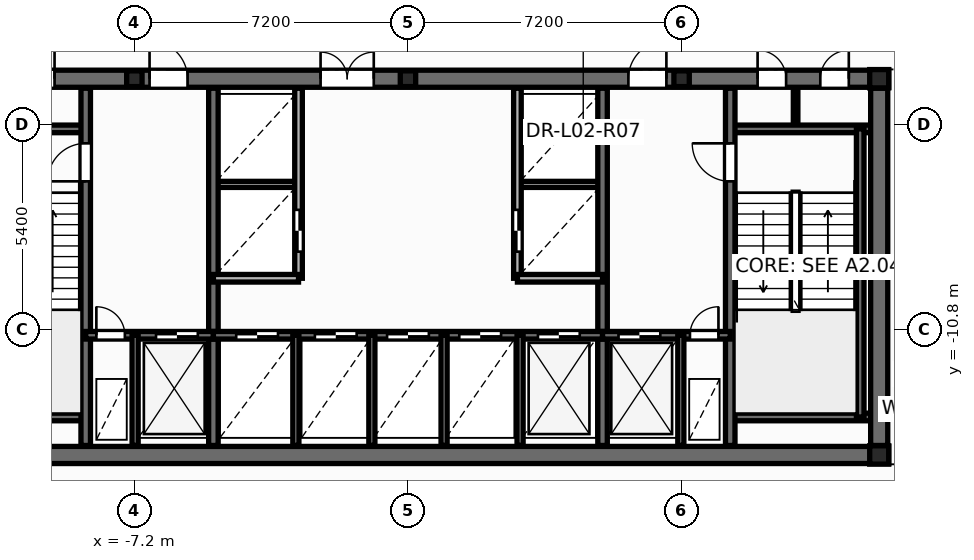
"""IFC4 building model, lengths in metres.
Left out: names, types, materials, properties, quantities, classifications, styles, units other than length and angle.
Written with IfcOpenShell. Run it as: python <this file> out.ifc"""

import sys

from ifc_helpers import new_model, si_unit, direction, frame, frame_2d, origin, origin_2d, place, context, subcontext, project, spatial, rectangle, i_section, extrude, element, fill, save


model = new_model("IFC4")
c1 = context("Model", 3, precision=1e-05, world=origin(), true_north=direction((0.0, 1.0)))
c2 = subcontext(c1, "Body", "Model", "MODEL_VIEW")
j1 = project(units=[si_unit("LENGTHUNIT", "METRE"), si_unit("PLANEANGLEUNIT", "RADIAN")], contexts=[c1])
p1 = place(None, origin())
s1 = spatial("IfcSite", under=j1, at=p1, CompositionType="ELEMENT")
p2 = place(p1, origin())
s2 = spatial("IfcBuilding", under=s1, at=p2, CompositionType="ELEMENT")
p3 = place(p2, frame((0.0, 0.0, 9.9)))
s3 = spatial("IfcBuildingStorey", under=s2, at=p3, CompositionType="ELEMENT", Elevation=9.9)
for number, where, z_axis, x_axis in (
    (1, (12.4, -14.1, 0.0), (0.0, 0.0, 1.0), (1.0, 0.0, 0.0)),
    (2, (12.4, -4.2, 0.0), (0.0, 0.0, 1.0), (1.0, 0.0, 0.0)),
):
    element("IfcColumn", number, at=place(p3, frame(where, z_axis=z_axis, x_axis=x_axis)), inside=s3, PredefinedType="COLUMN", context=c2, shape_type="SweptSolid", body=[
        extrude(i_section(OverallWidth=0.5, OverallDepth=0.482, WebThickness=0.04, FlangeThickness=0.045, at=origin_2d()), origin(), (0.0, 0.0, 1.0), 4.5),
    ])
for number, where, z_axis, x_axis in (
    (3, (-7.2, -4.2, 0.0), (0.0, 0.0, 1.0), (1.0, 0.0, 0.0)),
    (4, (0.0, -4.2, 0.0), (0.0, 0.0, 1.0), (1.0, 0.0, 0.0)),
    (5, (7.2, -4.2, 0.0), (0.0, 0.0, 1.0), (1.0, 0.0, 0.0)),
):
    element("IfcColumn", number, at=place(p3, frame(where, z_axis=z_axis, x_axis=x_axis)), inside=s3, PredefinedType="PILASTER", context=c2, shape_type="SweptSolid", body=[
        extrude(i_section(OverallWidth=0.405, OverallDepth=0.414, WebThickness=0.022, FlangeThickness=0.032, at=origin_2d()), origin(), (0.0, 0.0, 1.0), 4.5),
    ])
for number, where, z_axis, x_axis in (
    (6, (-5.12, -6.98, 0.0), (0.0, 0.0, 1.0), (1.0, 0.0, 0.0)),
    (7, (2.88, -6.98, 0.0), (0.0, 0.0, 1.0), (1.0, 0.0, 0.0)),
):
    element("IfcWall", number, at=place(p3, frame(where, z_axis=z_axis, x_axis=x_axis)), inside=s3, PredefinedType="PARTITIONING", context=c2, shape_type="SweptSolid", body=[
        extrude(rectangle(XDim=2.24, YDim=0.16, at=frame_2d((1.12, 0.0))), origin(), (0.0, 0.0, 1.0), 4.22),
    ])
p4 = place(p3, frame((10.2, -5.52, 0.0), z_axis=(0.0, 0.0, 1.0), x_axis=(0.0, 1.0, 0.0)))
e8 = element("IfcWall", 8, at=p4, inside=s3, PredefinedType="PARTITIONING", context=c2, shape_type="SweptSolid", body=[
    extrude(rectangle(XDim=1.12, YDim=0.12, at=frame_2d((0.56, 0.0))), origin(), (0.0, 0.0, 1.0), 4.22),
])
p5 = place(p3, frame((-12.65, -14.1, 0.0), z_axis=(0.0, 0.0, 1.0), x_axis=(1.0, 0.0, 0.0)))
e9 = element("IfcWall", 9, at=p5, inside=s3, PredefinedType="SHEAR", context=c2, shape_type="SweptSolid", body=[
    extrude(rectangle(XDim=25.3, YDim=0.45, at=frame_2d((12.65, 0.0))), origin(), (0.0, 0.0, 1.0), 4.5),
])
p6 = place(p3, frame((-12.65, -4.2, 0.0), z_axis=(0.0, 0.0, 1.0), x_axis=(1.0, 0.0, 0.0)))
e10 = element("IfcWall", 10, at=p6, inside=s3, PredefinedType="SHEAR", context=c2, shape_type="SweptSolid", body=[
    extrude(rectangle(XDim=25.3, YDim=0.45, at=frame_2d((12.65, 0.0))), origin(), (0.0, 0.0, 1.0), 4.5),
])
p7 = place(p6, frame((0.95, 0.0, 0.0)))
e11 = element("IfcOpeningElement", 11, at=p7, cuts=e10, PredefinedType="OPENING", context=c2, shape_type="SweptSolid", body=[
    extrude(rectangle(XDim=0.756, YDim=2.054, at=frame_2d((0.375, 1.027))), frame((0.0, 0.235, 0.0), z_axis=(0.0, -1.0, 0.0), x_axis=(1.0, 0.0, 0.0)), (0.0, 0.0, 1.0), 0.47),
])
p8 = place(p6, frame((2.6, 0.0, 0.0)))
e12 = element("IfcOpeningElement", 12, at=p8, cuts=e10, PredefinedType="OPENING", context=c2, shape_type="SweptSolid", body=[
    extrude(rectangle(XDim=0.756, YDim=2.054, at=frame_2d((0.375, 1.027))), frame((0.0, 0.235, 0.0), z_axis=(0.0, -1.0, 0.0), x_axis=(1.0, 0.0, 0.0)), (0.0, 0.0, 1.0), 0.47),
])
p9 = place(p6, frame((21.85, 0.0, 0.0)))
e13 = element("IfcOpeningElement", 13, at=p9, cuts=e10, PredefinedType="OPENING", context=c2, shape_type="SweptSolid", body=[
    extrude(rectangle(XDim=0.756, YDim=2.054, at=frame_2d((0.375, 1.027))), frame((0.0, 0.235, 0.0), z_axis=(0.0, -1.0, 0.0), x_axis=(1.0, 0.0, 0.0)), (0.0, 0.0, 1.0), 0.47),
])
p10 = place(p6, frame((23.5, 0.0, 0.0)))
e14 = element("IfcOpeningElement", 14, at=p10, cuts=e10, PredefinedType="OPENING", context=c2, shape_type="SweptSolid", body=[
    extrude(rectangle(XDim=0.756, YDim=2.054, at=frame_2d((0.375, 1.027))), frame((0.0, 0.235, 0.0), z_axis=(0.0, -1.0, 0.0), x_axis=(1.0, 0.0, 0.0)), (0.0, 0.0, 1.0), 0.47),
])
p11 = place(p6, frame((5.85, 0.0, 0.0)))
e15 = element("IfcOpeningElement", 15, at=p11, cuts=e10, PredefinedType="OPENING", context=c2, shape_type="SweptSolid", body=[
    extrude(rectangle(XDim=1.006, YDim=2.104, at=frame_2d((0.5, 1.052))), frame((0.0, 0.235, 0.0), z_axis=(0.0, -1.0, 0.0), x_axis=(1.0, 0.0, 0.0)), (0.0, 0.0, 1.0), 0.47),
])
p12 = place(p6, frame((10.35, 0.0, 0.0)))
e16 = element("IfcOpeningElement", 16, at=p12, cuts=e10, PredefinedType="OPENING", context=c2, shape_type="SweptSolid", body=[
    extrude(rectangle(XDim=1.406, YDim=2.154, at=frame_2d((0.7, 1.077))), frame((0.0, 0.235, 0.0), z_axis=(0.0, -1.0, 0.0), x_axis=(1.0, 0.0, 0.0)), (0.0, 0.0, 1.0), 0.47),
])
p13 = place(p6, frame((18.45, 0.0, 0.0)))
e17 = element("IfcOpeningElement", 17, at=p13, cuts=e10, PredefinedType="OPENING", context=c2, shape_type="SweptSolid", body=[
    extrude(rectangle(XDim=1.006, YDim=2.104, at=frame_2d((0.5, 1.052))), frame((0.0, 0.235, 0.0), z_axis=(0.0, -1.0, 0.0), x_axis=(1.0, 0.0, 0.0)), (0.0, 0.0, 1.0), 0.47),
])
for number, where, z_axis, x_axis in (
    (18, (-12.35, -5.52, 0.0), (0.0, 0.0, 1.0), (1.0, 0.0, 0.0)),
    (19, (-12.35, -13.1, 0.0), (0.0, 0.0, 1.0), (1.0, 0.0, 0.0)),
    (20, (8.48, -5.52, 0.0), (0.0, 0.0, 1.0), (1.0, 0.0, 0.0)),
    (21, (8.48, -13.1, 0.0), (0.0, 0.0, 1.0), (1.0, 0.0, 0.0)),
):
    element("IfcWall", number, at=place(p3, frame(where, z_axis=z_axis, x_axis=x_axis)), inside=s3, PredefinedType="SOLIDWALL", context=c2, shape_type="SweptSolid", body=[
        extrude(rectangle(XDim=3.87, YDim=0.2, at=frame_2d((1.935, 0.0))), origin(), (0.0, 0.0, 1.0), 4.5),
    ])
p14 = place(p3, frame((11.9, -13.1, 0.0), z_axis=(0.0, 0.0, 1.0), x_axis=(0.0, 1.0, 0.0)))
e22 = element("IfcWall", 22, at=p14, inside=s3, PredefinedType="SOLIDWALL", context=c2, shape_type="SweptSolid", body=[
    extrude(rectangle(XDim=7.58, YDim=0.2, at=frame_2d((3.79, 0.0))), origin(), (0.0, 0.0, 1.0), 4.5),
])
p15 = place(p3, frame((-8.48, -13.85, 0.0), z_axis=(0.0, 0.0, 1.0), x_axis=(0.0, 1.0, 0.0)))
e23 = element("IfcWall", 23, at=p15, inside=s3, PredefinedType="SHEAR", context=c2, shape_type="SweptSolid", body=[
    extrude(rectangle(XDim=9.4, YDim=0.25, at=frame_2d((4.7, 0.0))), origin(), (0.0, 0.0, 1.0), 4.5),
])
p16 = place(p15, frame((6.95, 0.0, 0.0)))
e24 = element("IfcOpeningElement", 24, at=p16, cuts=e23, PredefinedType="OPENING", context=c2, shape_type="SweptSolid", body=[
    extrude(rectangle(XDim=1.006, YDim=2.104, at=frame_2d((0.5, 1.052))), frame((0.0, 0.135, 0.0), z_axis=(0.0, -1.0, 0.0), x_axis=(1.0, 0.0, 0.0)), (0.0, 0.0, 1.0), 0.27),
])
p17 = place(p3, frame((8.48, -13.85, 0.0), z_axis=(0.0, 0.0, 1.0), x_axis=(0.0, 1.0, 0.0)))
e25 = element("IfcWall", 25, at=p17, inside=s3, PredefinedType="SHEAR", context=c2, shape_type="SweptSolid", body=[
    extrude(rectangle(XDim=9.4, YDim=0.25, at=frame_2d((4.7, 0.0))), origin(), (0.0, 0.0, 1.0), 4.5),
])
p18 = place(p17, frame((6.95, 0.0, 0.0)))
e26 = element("IfcOpeningElement", 26, at=p18, cuts=e25, PredefinedType="OPENING", context=c2, shape_type="SweptSolid", body=[
    extrude(rectangle(XDim=1.006, YDim=2.104, at=frame_2d((0.5, 1.052))), frame((0.0, 0.135, 0.0), z_axis=(0.0, -1.0, 0.0), x_axis=(1.0, 0.0, 0.0)), (0.0, 0.0, 1.0), 0.27),
])
for number, where, z_axis, x_axis in (
    (27, (-5.12, -13.85, 0.0), (0.0, 0.0, 1.0), (0.0, 1.0, 0.0)),
    (28, (5.12, -13.85, 0.0), (0.0, 0.0, 1.0), (0.0, 1.0, 0.0)),
):
    element("IfcWall", number, at=place(p3, frame(where, z_axis=z_axis, x_axis=x_axis)), inside=s3, PredefinedType="SHEAR", context=c2, shape_type="SweptSolid", body=[
        extrude(rectangle(XDim=9.4, YDim=0.25, at=frame_2d((4.7, 0.0))), origin(), (0.0, 0.0, 1.0), 4.5),
    ])
p19 = place(p3, frame((-8.48, -10.95, 0.0), z_axis=(0.0, 0.0, 1.0), x_axis=(1.0, 0.0, 0.0)))
e29 = element("IfcWall", 29, at=p19, inside=s3, PredefinedType="SOLIDWALL", context=c2, shape_type="SweptSolid", body=[
    extrude(rectangle(XDim=3.36, YDim=0.2, at=frame_2d((1.68, 0.0))), origin(), (0.0, 0.0, 1.0), 4.5),
])
p20 = place(p19, frame((0.28, 0.0, 0.0)))
e30 = element("IfcOpeningElement", 30, at=p20, cuts=e29, PredefinedType="OPENING", context=c2, shape_type="SweptSolid", body=[
    extrude(rectangle(XDim=0.756, YDim=2.054, at=frame_2d((0.375, 1.027))), frame((0.0, 0.11, 0.0), z_axis=(0.0, -1.0, 0.0), x_axis=(1.0, 0.0, 0.0)), (0.0, 0.0, 1.0), 0.22),
])
p21 = place(p19, frame((1.85, 0.0, 0.0)))
e31 = element("IfcOpeningElement", 31, at=p21, cuts=e29, PredefinedType="OPENING", context=c2, shape_type="SweptSolid", body=[
    extrude(rectangle(XDim=1.106, YDim=2.104, at=frame_2d((0.55, 1.052))), frame((0.0, 0.11, 0.0), z_axis=(0.0, -1.0, 0.0), x_axis=(1.0, 0.0, 0.0)), (0.0, 0.0, 1.0), 0.22),
])
p22 = place(p3, frame((-5.12, -10.95, 0.0), z_axis=(0.0, 0.0, 1.0), x_axis=(1.0, 0.0, 0.0)))
e32 = element("IfcWall", 32, at=p22, inside=s3, PredefinedType="SOLIDWALL", context=c2, shape_type="SweptSolid", body=[
    extrude(rectangle(XDim=10.24, YDim=0.2, at=frame_2d((5.12, 0.0))), origin(), (0.0, 0.0, 1.0), 4.5),
])
p23 = place(p22, frame((0.6, 0.0, 0.0)))
e33 = element("IfcOpeningElement", 33, at=p23, cuts=e32, PredefinedType="OPENING", context=c2, shape_type="SweptSolid", body=[
    extrude(rectangle(XDim=1.106, YDim=2.104, at=frame_2d((0.55, 1.052))), frame((0.0, 0.11, 0.0), z_axis=(0.0, -1.0, 0.0), x_axis=(1.0, 0.0, 0.0)), (0.0, 0.0, 1.0), 0.22),
])
p24 = place(p22, frame((2.67, 0.0, 0.0)))
e34 = element("IfcOpeningElement", 34, at=p24, cuts=e32, PredefinedType="OPENING", context=c2, shape_type="SweptSolid", body=[
    extrude(rectangle(XDim=1.106, YDim=2.104, at=frame_2d((0.55, 1.052))), frame((0.0, 0.11, 0.0), z_axis=(0.0, -1.0, 0.0), x_axis=(1.0, 0.0, 0.0)), (0.0, 0.0, 1.0), 0.22),
])
p25 = place(p22, frame((4.57, 0.0, 0.0)))
e35 = element("IfcOpeningElement", 35, at=p25, cuts=e32, PredefinedType="OPENING", context=c2, shape_type="SweptSolid", body=[
    extrude(rectangle(XDim=1.106, YDim=2.104, at=frame_2d((0.55, 1.052))), frame((0.0, 0.11, 0.0), z_axis=(0.0, -1.0, 0.0), x_axis=(1.0, 0.0, 0.0)), (0.0, 0.0, 1.0), 0.22),
])
p26 = place(p22, frame((6.47, 0.0, 0.0)))
e36 = element("IfcOpeningElement", 36, at=p26, cuts=e32, PredefinedType="OPENING", context=c2, shape_type="SweptSolid", body=[
    extrude(rectangle(XDim=1.106, YDim=2.104, at=frame_2d((0.55, 1.052))), frame((0.0, 0.11, 0.0), z_axis=(0.0, -1.0, 0.0), x_axis=(1.0, 0.0, 0.0)), (0.0, 0.0, 1.0), 0.22),
])
p27 = place(p22, frame((8.54, 0.0, 0.0)))
e37 = element("IfcOpeningElement", 37, at=p27, cuts=e32, PredefinedType="OPENING", context=c2, shape_type="SweptSolid", body=[
    extrude(rectangle(XDim=1.106, YDim=2.104, at=frame_2d((0.55, 1.052))), frame((0.0, 0.11, 0.0), z_axis=(0.0, -1.0, 0.0), x_axis=(1.0, 0.0, 0.0)), (0.0, 0.0, 1.0), 0.22),
])
p28 = place(p3, frame((5.12, -10.95, 0.0), z_axis=(0.0, 0.0, 1.0), x_axis=(1.0, 0.0, 0.0)))
e38 = element("IfcWall", 38, at=p28, inside=s3, PredefinedType="SOLIDWALL", context=c2, shape_type="SweptSolid", body=[
    extrude(rectangle(XDim=3.36, YDim=0.2, at=frame_2d((1.68, 0.0))), origin(), (0.0, 0.0, 1.0), 4.5),
])
p29 = place(p28, frame((0.42, 0.0, 0.0)))
e39 = element("IfcOpeningElement", 39, at=p29, cuts=e38, PredefinedType="OPENING", context=c2, shape_type="SweptSolid", body=[
    extrude(rectangle(XDim=1.106, YDim=2.104, at=frame_2d((0.55, 1.052))), frame((0.0, 0.11, 0.0), z_axis=(0.0, -1.0, 0.0), x_axis=(1.0, 0.0, 0.0)), (0.0, 0.0, 1.0), 0.22),
])
p30 = place(p28, frame((2.3, 0.0, 0.0)))
e40 = element("IfcOpeningElement", 40, at=p30, cuts=e38, PredefinedType="OPENING", context=c2, shape_type="SweptSolid", body=[
    extrude(rectangle(XDim=0.756, YDim=2.054, at=frame_2d((0.375, 1.027))), frame((0.0, 0.11, 0.0), z_axis=(0.0, -1.0, 0.0), x_axis=(1.0, 0.0, 0.0)), (0.0, 0.0, 1.0), 0.22),
])
for number, where, z_axis, x_axis in (
    (41, (-7.18, -13.85, 0.0), (0.0, 0.0, 1.0), (0.0, 1.0, 0.0)),
    (42, (7.18, -13.85, 0.0), (0.0, 0.0, 1.0), (0.0, 1.0, 0.0)),
    (43, (-2.95, -13.85, 0.0), (0.0, 0.0, 1.0), (0.0, 1.0, 0.0)),
    (44, (2.95, -13.85, 0.0), (0.0, 0.0, 1.0), (0.0, 1.0, 0.0)),
):
    element("IfcWall", number, at=place(p3, frame(where, z_axis=z_axis, x_axis=x_axis)), inside=s3, PredefinedType="PARTITIONING", context=c2, shape_type="SweptSolid", body=[
        extrude(rectangle(XDim=2.9, YDim=0.16, at=frame_2d((1.45, 0.0))), origin(), (0.0, 0.0, 1.0), 3.245),
    ])
p31 = place(p3, frame((12.4, -13.85, 0.0), z_axis=(0.0, 0.0, 1.0), x_axis=(0.0, 1.0, 0.0)))
e45 = element("IfcWall", 45, at=p31, inside=s3, PredefinedType="SHEAR", context=c2, shape_type="SweptSolid", body=[
    extrude(rectangle(XDim=9.4, YDim=0.45, at=frame_2d((4.7, 0.0))), origin(), (0.0, 0.0, 1.0), 4.5),
])
p32 = place(p3, frame((-2.88, -9.45, 0.0), z_axis=(0.0, 0.0, 1.0), x_axis=(0.0, 1.0, 0.0)))
e46 = element("IfcWall", 46, at=p32, inside=s3, PredefinedType="SOLIDWALL", context=c2, shape_type="SweptSolid", body=[
    extrude(rectangle(XDim=5.0, YDim=0.2, at=frame_2d((2.5, 0.0))), origin(), (0.0, 0.0, 1.0), 4.22),
])
p33 = place(p32, frame((0.7, 0.0, 0.0)))
e47 = element("IfcOpeningElement", 47, at=p33, cuts=e46, PredefinedType="OPENING", context=c2, shape_type="SweptSolid", body=[
    extrude(rectangle(XDim=1.106, YDim=2.104, at=frame_2d((0.55, 1.052))), frame((0.0, 0.11, 0.0), z_axis=(0.0, -1.0, 0.0), x_axis=(1.0, 0.0, 0.0)), (0.0, 0.0, 1.0), 0.22),
])
p34 = place(p3, frame((-5.12, -9.45, 0.0), z_axis=(0.0, 0.0, 1.0), x_axis=(1.0, 0.0, 0.0)))
e48 = element("IfcWall", 48, at=p34, inside=s3, PredefinedType="SOLIDWALL", context=c2, shape_type="SweptSolid", body=[
    extrude(rectangle(XDim=2.24, YDim=0.2, at=frame_2d((1.12, 0.0))), origin(), (0.0, 0.0, 1.0), 4.22),
])
p35 = place(p3, frame((2.88, -9.45, 0.0), z_axis=(0.0, 0.0, 1.0), x_axis=(0.0, 1.0, 0.0)))
e49 = element("IfcWall", 49, at=p35, inside=s3, PredefinedType="SOLIDWALL", context=c2, shape_type="SweptSolid", body=[
    extrude(rectangle(XDim=5.0, YDim=0.2, at=frame_2d((2.5, 0.0))), origin(), (0.0, 0.0, 1.0), 4.22),
])
p36 = place(p35, frame((0.7, 0.0, 0.0)))
e50 = element("IfcOpeningElement", 50, at=p36, cuts=e49, PredefinedType="OPENING", context=c2, shape_type="SweptSolid", body=[
    extrude(rectangle(XDim=1.106, YDim=2.104, at=frame_2d((0.55, 1.052))), frame((0.0, 0.11, 0.0), z_axis=(0.0, -1.0, 0.0), x_axis=(1.0, 0.0, 0.0)), (0.0, 0.0, 1.0), 0.22),
])
p37 = place(p3, frame((2.88, -9.45, 0.0), z_axis=(0.0, 0.0, 1.0), x_axis=(1.0, 0.0, 0.0)))
e51 = element("IfcWall", 51, at=p37, inside=s3, PredefinedType="SOLIDWALL", context=c2, shape_type="SweptSolid", body=[
    extrude(rectangle(XDim=2.24, YDim=0.2, at=frame_2d((1.12, 0.0))), origin(), (0.0, 0.0, 1.0), 4.22),
])
for number, where, z_axis, x_axis in (
    (52, (-0.95, -13.85, 0.0), (0.0, 0.0, 1.0), (0.0, 1.0, 0.0)),
    (53, (0.95, -13.85, 0.0), (0.0, 0.0, 1.0), (0.0, 1.0, 0.0)),
):
    element("IfcWall", number, at=place(p3, frame(where, z_axis=z_axis, x_axis=x_axis)), inside=s3, PredefinedType="PARTITIONING", context=c2, shape_type="SweptSolid", body=[
        extrude(rectangle(XDim=2.9, YDim=0.16, at=frame_2d((1.45, 0.0))), origin(), (0.0, 0.0, 1.0), 3.245),
    ])
p38 = place(p33, origin())
e54 = element("IfcDoor", 54, at=p38, inside=s3, OperationType="DOUBLE_DOOR_SLIDING", PredefinedType="DOOR", context=c2, shape_type="SweptSolid", body=[
    extrude(rectangle(XDim=1.1, YDim=2.1, at=frame_2d((0.55, 1.05))), frame((0.0, 0.025, 0.0), z_axis=(0.0, -1.0, 0.0), x_axis=(1.0, 0.0, 0.0)), (0.0, 0.0, 1.0), 0.05),
])
fill(e47, e54)
p39 = place(p36, origin())
e55 = element("IfcDoor", 55, at=p39, inside=s3, OperationType="DOUBLE_DOOR_SLIDING", PredefinedType="DOOR", context=c2, shape_type="SweptSolid", body=[
    extrude(rectangle(XDim=1.1, YDim=2.1, at=frame_2d((0.55, 1.05))), frame((0.0, 0.025, 0.0), z_axis=(0.0, -1.0, 0.0), x_axis=(1.0, 0.0, 0.0)), (0.0, 0.0, 1.0), 0.05),
])
fill(e50, e55)
p40 = place(p16, origin())
e56 = element("IfcDoor", 56, at=p40, inside=s3, OperationType="SINGLE_SWING_LEFT", PredefinedType="DOOR", context=c2, shape_type="SweptSolid", body=[
    extrude(rectangle(XDim=1.0, YDim=2.1, at=frame_2d((0.5, 1.05))), frame((0.0, 0.025, 0.0), z_axis=(0.0, -1.0, 0.0), x_axis=(1.0, 0.0, 0.0)), (0.0, 0.0, 1.0), 0.05),
])
fill(e24, e56)
p41 = place(p18, origin())
e57 = element("IfcDoor", 57, at=p41, inside=s3, OperationType="SINGLE_SWING_RIGHT", PredefinedType="DOOR", context=c2, shape_type="SweptSolid", body=[
    extrude(rectangle(XDim=1.0, YDim=2.1, at=frame_2d((0.5, 1.05))), frame((0.0, 0.025, 0.0), z_axis=(0.0, -1.0, 0.0), x_axis=(1.0, 0.0, 0.0)), (0.0, 0.0, 1.0), 0.05),
])
fill(e26, e57)
p42 = place(p20, origin())
e58 = element("IfcDoor", 58, at=p42, inside=s3, OperationType="SINGLE_SWING_LEFT", PredefinedType="DOOR", context=c2, shape_type="SweptSolid", body=[
    extrude(rectangle(XDim=0.75, YDim=2.05, at=frame_2d((0.375, 1.025))), frame((0.0, 0.025, 0.0), z_axis=(0.0, -1.0, 0.0), x_axis=(1.0, 0.0, 0.0)), (0.0, 0.0, 1.0), 0.05),
])
fill(e30, e58)
p43 = place(p21, origin())
e59 = element("IfcDoor", 59, at=p43, inside=s3, OperationType="DOUBLE_DOOR_SLIDING", PredefinedType="DOOR", context=c2, shape_type="SweptSolid", body=[
    extrude(rectangle(XDim=1.1, YDim=2.1, at=frame_2d((0.55, 1.05))), frame((0.0, 0.025, 0.0), z_axis=(0.0, -1.0, 0.0), x_axis=(1.0, 0.0, 0.0)), (0.0, 0.0, 1.0), 0.05),
])
fill(e31, e59)
p44 = place(p29, origin())
e60 = element("IfcDoor", 60, at=p44, inside=s3, OperationType="DOUBLE_DOOR_SLIDING", PredefinedType="DOOR", context=c2, shape_type="SweptSolid", body=[
    extrude(rectangle(XDim=1.1, YDim=2.1, at=frame_2d((0.55, 1.05))), frame((0.0, 0.025, 0.0), z_axis=(0.0, -1.0, 0.0), x_axis=(1.0, 0.0, 0.0)), (0.0, 0.0, 1.0), 0.05),
])
fill(e39, e60)
p45 = place(p30, origin())
e61 = element("IfcDoor", 61, at=p45, inside=s3, OperationType="SINGLE_SWING_RIGHT", PredefinedType="DOOR", context=c2, shape_type="SweptSolid", body=[
    extrude(rectangle(XDim=0.75, YDim=2.05, at=frame_2d((0.375, 1.025))), frame((0.0, 0.025, 0.0), z_axis=(0.0, -1.0, 0.0), x_axis=(1.0, 0.0, 0.0)), (0.0, 0.0, 1.0), 0.05),
])
fill(e40, e61)
p46 = place(p23, origin())
e62 = element("IfcDoor", 62, at=p46, inside=s3, OperationType="DOUBLE_DOOR_SLIDING", PredefinedType="DOOR", context=c2, shape_type="SweptSolid", body=[
    extrude(rectangle(XDim=1.1, YDim=2.1, at=frame_2d((0.55, 1.05))), frame((0.0, 0.025, 0.0), z_axis=(0.0, -1.0, 0.0), x_axis=(1.0, 0.0, 0.0)), (0.0, 0.0, 1.0), 0.05),
])
fill(e33, e62)
p47 = place(p24, origin())
e63 = element("IfcDoor", 63, at=p47, inside=s3, OperationType="DOUBLE_DOOR_SLIDING", PredefinedType="DOOR", context=c2, shape_type="SweptSolid", body=[
    extrude(rectangle(XDim=1.1, YDim=2.1, at=frame_2d((0.55, 1.05))), frame((0.0, 0.025, 0.0), z_axis=(0.0, -1.0, 0.0), x_axis=(1.0, 0.0, 0.0)), (0.0, 0.0, 1.0), 0.05),
])
fill(e34, e63)
p48 = place(p25, origin())
e64 = element("IfcDoor", 64, at=p48, inside=s3, OperationType="DOUBLE_DOOR_SLIDING", PredefinedType="DOOR", context=c2, shape_type="SweptSolid", body=[
    extrude(rectangle(XDim=1.1, YDim=2.1, at=frame_2d((0.55, 1.05))), frame((0.0, 0.025, 0.0), z_axis=(0.0, -1.0, 0.0), x_axis=(1.0, 0.0, 0.0)), (0.0, 0.0, 1.0), 0.05),
])
fill(e35, e64)
p49 = place(p26, origin())
e65 = element("IfcDoor", 65, at=p49, inside=s3, OperationType="DOUBLE_DOOR_SLIDING", PredefinedType="DOOR", context=c2, shape_type="SweptSolid", body=[
    extrude(rectangle(XDim=1.1, YDim=2.1, at=frame_2d((0.55, 1.05))), frame((0.0, 0.025, 0.0), z_axis=(0.0, -1.0, 0.0), x_axis=(1.0, 0.0, 0.0)), (0.0, 0.0, 1.0), 0.05),
])
fill(e36, e65)
p50 = place(p27, origin())
e66 = element("IfcDoor", 66, at=p50, inside=s3, OperationType="DOUBLE_DOOR_SLIDING", PredefinedType="DOOR", context=c2, shape_type="SweptSolid", body=[
    extrude(rectangle(XDim=1.1, YDim=2.1, at=frame_2d((0.55, 1.05))), frame((0.0, 0.025, 0.0), z_axis=(0.0, -1.0, 0.0), x_axis=(1.0, 0.0, 0.0)), (0.0, 0.0, 1.0), 0.05),
])
fill(e37, e66)
p51 = place(p8, origin())
e67 = element("IfcDoor", 67, at=p51, inside=s3, OperationType="SINGLE_SWING_RIGHT", PredefinedType="DOOR", context=c2, shape_type="SweptSolid", body=[
    extrude(rectangle(XDim=0.75, YDim=2.05, at=frame_2d((0.375, 1.025))), frame((0.0, 0.025, 0.0), z_axis=(0.0, -1.0, 0.0), x_axis=(1.0, 0.0, 0.0)), (0.0, 0.0, 1.0), 0.05),
])
fill(e12, e67)
p52 = place(p9, origin())
e68 = element("IfcDoor", 68, at=p52, inside=s3, OperationType="SINGLE_SWING_LEFT", PredefinedType="DOOR", context=c2, shape_type="SweptSolid", body=[
    extrude(rectangle(XDim=0.75, YDim=2.05, at=frame_2d((0.375, 1.025))), frame((0.0, 0.025, 0.0), z_axis=(0.0, -1.0, 0.0), x_axis=(1.0, 0.0, 0.0)), (0.0, 0.0, 1.0), 0.05),
])
fill(e13, e68)
p53 = place(p10, origin())
e69 = element("IfcDoor", 69, at=p53, inside=s3, OperationType="SINGLE_SWING_RIGHT", PredefinedType="DOOR", context=c2, shape_type="SweptSolid", body=[
    extrude(rectangle(XDim=0.75, YDim=2.05, at=frame_2d((0.375, 1.025))), frame((0.0, 0.025, 0.0), z_axis=(0.0, -1.0, 0.0), x_axis=(1.0, 0.0, 0.0)), (0.0, 0.0, 1.0), 0.05),
])
fill(e14, e69)
p54 = place(p11, origin())
e70 = element("IfcDoor", 70, at=p54, inside=s3, OperationType="SINGLE_SWING_LEFT", PredefinedType="DOOR", context=c2, shape_type="SweptSolid", body=[
    extrude(rectangle(XDim=1.0, YDim=2.1, at=frame_2d((0.5, 1.05))), frame((0.0, 0.025, 0.0), z_axis=(0.0, -1.0, 0.0), x_axis=(1.0, 0.0, 0.0)), (0.0, 0.0, 1.0), 0.05),
])
fill(e15, e70)
p55 = place(p12, origin())
e71 = element("IfcDoor", 71, at=p55, inside=s3, OperationType="DOUBLE_DOOR_SINGLE_SWING", PredefinedType="DOOR", context=c2, shape_type="SweptSolid", body=[
    extrude(rectangle(XDim=1.4, YDim=2.15, at=frame_2d((0.7, 1.075))), frame((0.0, 0.025, 0.0), z_axis=(0.0, -1.0, 0.0), x_axis=(1.0, 0.0, 0.0)), (0.0, 0.0, 1.0), 0.05),
])
fill(e16, e71)
p56 = place(p13, origin())
e72 = element("IfcDoor", 72, at=p56, inside=s3, OperationType="SINGLE_SWING_RIGHT", PredefinedType="DOOR", context=c2, shape_type="SweptSolid", body=[
    extrude(rectangle(XDim=1.0, YDim=2.1, at=frame_2d((0.5, 1.05))), frame((0.0, 0.025, 0.0), z_axis=(0.0, -1.0, 0.0), x_axis=(1.0, 0.0, 0.0)), (0.0, 0.0, 1.0), 0.05),
])
fill(e17, e72)
save(model, sys.argv[1])
